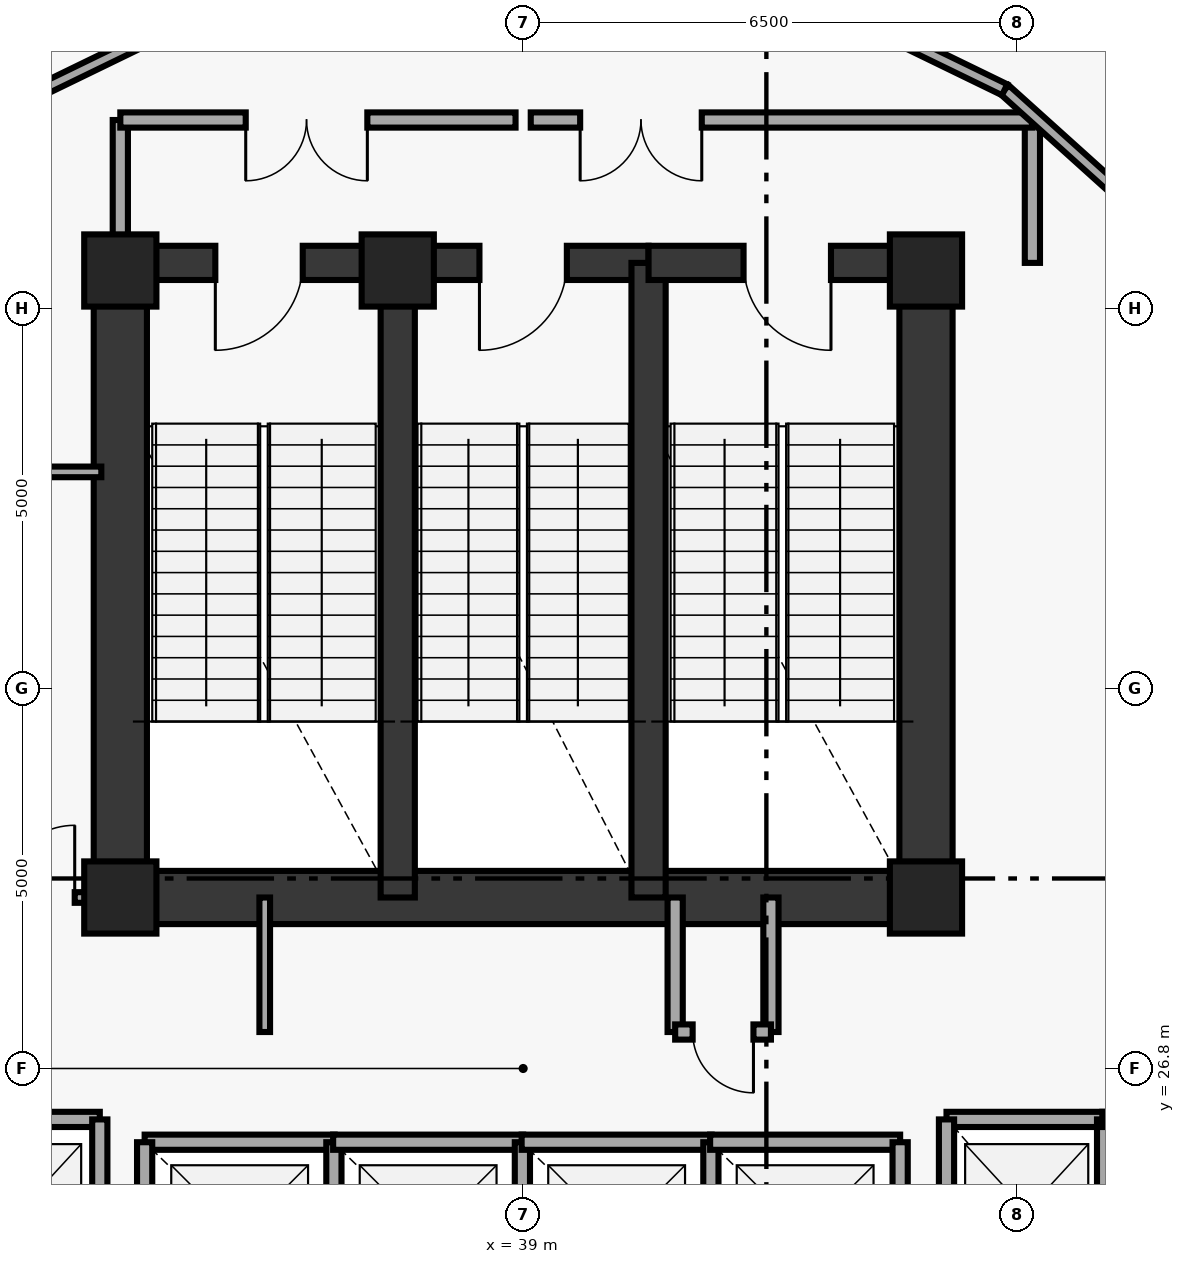
"""IFC4 building model, lengths in metres.
Left out: names, types, materials, properties, quantities, classifications, styles, units other than length and angle.
Written with IfcOpenShell. Run it as: python <this file> out.ifc"""

import sys

from ifc_helpers import new_model, si_unit, direction, frame, frame_2d, origin, origin_2d, place, context, subcontext, project, spatial, rectangle, extrude, element, fill, save


model = new_model("IFC4")
c1 = context("Model", 3, precision=1e-05, world=origin(), true_north=direction((0.0, 1.0)))
c2 = subcontext(c1, "Body", "Model", "MODEL_VIEW")
j1 = project(units=[si_unit("LENGTHUNIT", "METRE"), si_unit("PLANEANGLEUNIT", "RADIAN")], contexts=[c1])
p1 = place(None, origin())
s1 = spatial("IfcSite", under=j1, at=p1, CompositionType="ELEMENT")
p2 = place(p1, origin())
s2 = spatial("IfcBuilding", under=s1, at=p2, CompositionType="ELEMENT")
p3 = place(p2, frame((0.0, 0.0, 113.25)))
s3 = spatial("IfcBuildingStorey", under=s2, at=p3, CompositionType="ELEMENT", Elevation=113.25)
for number, where, z_axis, x_axis in (
    (1, (44.3, 29.05, 0.0), (0.0, 0.0, 1.0), (1.0, 0.0, 0.0)),
    (2, (44.3, 37.3, 0.0), (0.0, 0.0, 1.0), (1.0, 0.0, 0.0)),
    (3, (37.35, 37.3, 0.0), (0.0, 0.0, 1.0), (1.0, 0.0, 0.0)),
    (4, (33.7, 37.3, 0.0), (0.0, 0.0, 1.0), (1.0, 0.0, 0.0)),
    (5, (33.7, 29.05, 0.0), (0.0, 0.0, 1.0), (1.0, 0.0, 0.0)),
):
    element("IfcColumn", number, at=place(p3, frame(where, z_axis=z_axis, x_axis=x_axis)), inside=s3, PredefinedType="PILASTER", context=c2, shape_type="SweptSolid", body=[
        extrude(rectangle(XDim=0.95, YDim=0.95, at=origin_2d()), origin(), (0.0, 0.0, 1.0), 4.75),
    ])
for number, where, z_axis, x_axis in (
    (6, (33.7, 29.05, 0.0), (0.0, 0.0, 1.0), (0.0, 1.0, 0.0)),
    (7, (44.3, 29.05, 0.0), (0.0, 0.0, 1.0), (0.0, 1.0, 0.0)),
):
    element("IfcWall", number, at=place(p3, frame(where, z_axis=z_axis, x_axis=x_axis)), inside=s3, PredefinedType="SHEAR", context=c2, shape_type="SweptSolid", body=[
        extrude(rectangle(XDim=8.35, YDim=0.7, at=frame_2d((4.175, 0.0))), origin(), (0.0, 0.0, 1.0), 4.75),
    ])
p4 = place(p3, frame((33.7, 29.05, 0.0), z_axis=(0.0, 0.0, 1.0), x_axis=(1.0, 0.0, 0.0)))
e8 = element("IfcWall", 8, at=p4, inside=s3, PredefinedType="SHEAR", context=c2, shape_type="SweptSolid", body=[
    extrude(rectangle(XDim=10.6, YDim=0.7, at=frame_2d((5.3, 0.0))), origin(), (0.0, 0.0, 1.0), 4.75),
])
p5 = place(p3, frame((37.35, 37.4, 0.0), z_axis=(0.0, 0.0, 1.0), x_axis=(-1.0, 0.0, 0.0)))
e9 = element("IfcWall", 9, at=p5, inside=s3, PredefinedType="SHEAR", context=c2, shape_type="SweptSolid", body=[
    extrude(rectangle(XDim=3.65, YDim=0.45, at=frame_2d((1.825, 0.0))), origin(), (0.0, 0.0, 1.0), 4.75),
])
p6 = place(p5, frame((1.25, 0.0, 0.0)))
e10 = element("IfcOpeningElement", 10, at=p6, cuts=e9, PredefinedType="OPENING", context=c2, shape_type="SweptSolid", body=[
    extrude(rectangle(XDim=1.15, YDim=2.15, at=frame_2d((0.575, 1.075))), frame((0.0, 0.235, 0.0), z_axis=(0.0, -1.0, 0.0), x_axis=(1.0, 0.0, 0.0)), (0.0, 0.0, 1.0), 0.47),
])
p7 = place(p3, frame((37.35, 29.05, 0.0), z_axis=(0.0, 0.0, 1.0), x_axis=(0.0, 1.0, 0.0)))
e11 = element("IfcWall", 11, at=p7, inside=s3, PredefinedType="SHEAR", context=c2, shape_type="SweptSolid", body=[
    extrude(rectangle(XDim=8.35, YDim=0.45, at=frame_2d((4.175, 0.0))), origin(), (0.0, 0.0, 1.0), 4.75),
])
p8 = place(p3, frame((40.65, 37.4, 0.0), z_axis=(0.0, 0.0, 1.0), x_axis=(-1.0, 0.0, 0.0)))
e12 = element("IfcWall", 12, at=p8, inside=s3, PredefinedType="SHEAR", context=c2, shape_type="SweptSolid", body=[
    extrude(rectangle(XDim=3.3, YDim=0.45, at=frame_2d((1.65, 0.0))), origin(), (0.0, 0.0, 1.0), 4.75),
])
p9 = place(p8, frame((1.075, 0.0, 0.0)))
e13 = element("IfcOpeningElement", 13, at=p9, cuts=e12, PredefinedType="OPENING", context=c2, shape_type="SweptSolid", body=[
    extrude(rectangle(XDim=1.15, YDim=2.15, at=frame_2d((0.575, 1.075))), frame((0.0, 0.235, 0.0), z_axis=(0.0, -1.0, 0.0), x_axis=(1.0, 0.0, 0.0)), (0.0, 0.0, 1.0), 0.47),
])
p10 = place(p3, frame((40.65, 29.05, 0.0), z_axis=(0.0, 0.0, 1.0), x_axis=(0.0, 1.0, 0.0)))
e14 = element("IfcWall", 14, at=p10, inside=s3, PredefinedType="SHEAR", context=c2, shape_type="SweptSolid", body=[
    extrude(rectangle(XDim=8.35, YDim=0.45, at=frame_2d((4.175, 0.0))), origin(), (0.0, 0.0, 1.0), 4.75),
])
p11 = place(p3, frame((44.3, 37.4, 0.0), z_axis=(0.0, 0.0, 1.0), x_axis=(-1.0, 0.0, 0.0)))
e15 = element("IfcWall", 15, at=p11, inside=s3, PredefinedType="SHEAR", context=c2, shape_type="SweptSolid", body=[
    extrude(rectangle(XDim=3.65, YDim=0.45, at=frame_2d((1.825, 0.0))), origin(), (0.0, 0.0, 1.0), 4.75),
])
p12 = place(p11, frame((1.25, 0.0, 0.0)))
e16 = element("IfcOpeningElement", 16, at=p12, cuts=e15, PredefinedType="OPENING", context=c2, shape_type="SweptSolid", body=[
    extrude(rectangle(XDim=1.15, YDim=2.15, at=frame_2d((0.575, 1.075))), frame((0.0, 0.235, 0.0), z_axis=(0.0, -1.0, 0.0), x_axis=(1.0, 0.0, 0.0)), (0.0, 0.0, 1.0), 0.47),
])
for number, where, z_axis, x_axis in (
    (17, (33.7, 37.4, 0.0), (0.0, 0.0, 1.0), (0.0, 1.0, 0.0)),
    (18, (45.7, 37.4, 0.0), (0.0, 0.0, 1.0), (0.0, 1.0, 0.0)),
):
    element("IfcWall", number, at=place(p3, frame(where, z_axis=z_axis, x_axis=x_axis)), inside=s3, PredefinedType="SOLIDWALL", context=c2, shape_type="SweptSolid", body=[
        extrude(rectangle(XDim=1.88, YDim=0.2, at=frame_2d((0.94, 0.0))), origin(), (0.0, 0.0, 1.0), 4.75),
    ])
p13 = place(p3, frame((38.9, 39.28, 0.0), z_axis=(0.0, 0.0, 1.0), x_axis=(-1.0, 0.0, 0.0)))
e19 = element("IfcWall", 19, at=p13, inside=s3, PredefinedType="SOLIDWALL", context=c2, shape_type="SweptSolid", body=[
    extrude(rectangle(XDim=5.2, YDim=0.2, at=frame_2d((2.6, 0.0))), origin(), (0.0, 0.0, 1.0), 4.75),
])
p14 = place(p13, frame((1.95, 0.0, 0.0)))
e20 = element("IfcOpeningElement", 20, at=p14, cuts=e19, PredefinedType="OPENING", context=c2, shape_type="SweptSolid", body=[
    extrude(rectangle(XDim=1.6, YDim=2.2, at=frame_2d((0.8, 1.1))), frame((0.0, 0.11, 0.0), z_axis=(0.0, -1.0, 0.0), x_axis=(1.0, 0.0, 0.0)), (0.0, 0.0, 1.0), 0.22),
])
p15 = place(p3, frame((45.7, 39.28, 0.0), z_axis=(0.0, 0.0, 1.0), x_axis=(-1.0, 0.0, 0.0)))
e21 = element("IfcWall", 21, at=p15, inside=s3, PredefinedType="SOLIDWALL", context=c2, shape_type="SweptSolid", body=[
    extrude(rectangle(XDim=6.6, YDim=0.2, at=frame_2d((3.3, 0.0))), origin(), (0.0, 0.0, 1.0), 4.75),
])
p16 = place(p15, frame((4.35, 0.0, 0.0)))
e22 = element("IfcOpeningElement", 22, at=p16, cuts=e21, PredefinedType="OPENING", context=c2, shape_type="SweptSolid", body=[
    extrude(rectangle(XDim=1.6, YDim=2.2, at=frame_2d((0.8, 1.1))), frame((0.0, 0.11, 0.0), z_axis=(0.0, -1.0, 0.0), x_axis=(1.0, 0.0, 0.0)), (0.0, 0.0, 1.0), 0.22),
])
p17 = place(p3, frame((35.6, 27.28, 0.0), z_axis=(0.0, 0.0, 1.0), x_axis=(0.0, 1.0, 0.0)))
e23 = element("IfcWall", 23, at=p17, inside=s3, PredefinedType="PARTITIONING", context=c2, shape_type="SweptSolid", body=[
    extrude(rectangle(XDim=1.77, YDim=0.14, at=frame_2d((0.885, 0.0))), origin(), (0.0, 0.0, 1.0), 4.75),
])
for number, where, z_axis, x_axis in (
    (24, (41.0, 27.28, 0.0), (0.0, 0.0, 1.0), (0.0, 1.0, 0.0)),
    (25, (42.26, 27.28, 0.0), (0.0, 0.0, 1.0), (0.0, 1.0, 0.0)),
):
    element("IfcWall", number, at=place(p3, frame(where, z_axis=z_axis, x_axis=x_axis)), inside=s3, PredefinedType="SOLIDWALL", context=c2, shape_type="SweptSolid", body=[
        extrude(rectangle(XDim=1.77, YDim=0.2, at=frame_2d((0.885, 0.0))), origin(), (0.0, 0.0, 1.0), 4.75),
    ])
p18 = place(p3, frame((41.0, 27.28, 0.0), z_axis=(0.0, 0.0, 1.0), x_axis=(1.0, 0.0, 0.0)))
e26 = element("IfcWall", 26, at=p18, inside=s3, PredefinedType="SOLIDWALL", context=c2, shape_type="SweptSolid", body=[
    extrude(rectangle(XDim=1.26, YDim=0.2, at=frame_2d((0.63, 0.0))), origin(), (0.0, 0.0, 1.0), 4.75),
])
p19 = place(p18, frame((0.23, 0.0, 0.0)))
e27 = element("IfcOpeningElement", 27, at=p19, cuts=e26, PredefinedType="OPENING", context=c2, shape_type="SweptSolid", body=[
    extrude(rectangle(XDim=0.8, YDim=2.05, at=frame_2d((0.4, 1.025))), frame((0.0, 0.11, 0.0), z_axis=(0.0, -1.0, 0.0), x_axis=(1.0, 0.0, 0.0)), (0.0, 0.0, 1.0), 0.22),
])
p20 = place(p3, frame((31.32, 26.13, 0.0), z_axis=(0.0, 0.0, 1.0), x_axis=(1.0, 0.0, 0.0)))
e28 = element("IfcWall", 28, at=p20, inside=s3, PredefinedType="SOLIDWALL", context=c2, shape_type="SweptSolid", body=[
    extrude(rectangle(XDim=2.11, YDim=0.2, at=frame_2d((1.055, 0.0))), origin(), (0.0, 0.0, 1.0), 4.75),
])
p21 = place(p3, frame((33.43, 23.72, 0.0), z_axis=(0.0, 0.0, 1.0), x_axis=(0.0, 1.0, 0.0)))
e29 = element("IfcWall", 29, at=p21, inside=s3, PredefinedType="SOLIDWALL", context=c2, shape_type="SweptSolid", body=[
    extrude(rectangle(XDim=2.41, YDim=0.2, at=frame_2d((1.205, 0.0))), origin(), (0.0, 0.0, 1.0), 4.75),
])
p22 = place(p3, frame((44.57, 26.13, 0.0), z_axis=(0.0, 0.0, 1.0), x_axis=(1.0, 0.0, 0.0)))
e30 = element("IfcWall", 30, at=p22, inside=s3, PredefinedType="SOLIDWALL", context=c2, shape_type="SweptSolid", body=[
    extrude(rectangle(XDim=2.11, YDim=0.2, at=frame_2d((1.055, 0.0))), origin(), (0.0, 0.0, 1.0), 4.75),
])
for number, where, z_axis, x_axis in (
    (31, (44.57, 23.72, 0.0), (0.0, 0.0, 1.0), (0.0, 1.0, 0.0)),
    (32, (46.65, 23.72, 0.0), (0.0, 0.0, 1.0), (0.0, 1.0, 0.0)),
):
    element("IfcWall", number, at=place(p3, frame(where, z_axis=z_axis, x_axis=x_axis)), inside=s3, PredefinedType="SOLIDWALL", context=c2, shape_type="SweptSolid", body=[
        extrude(rectangle(XDim=2.41, YDim=0.2, at=frame_2d((1.205, 0.0))), origin(), (0.0, 0.0, 1.0), 4.75),
    ])
p23 = place(p3, frame((46.62, 26.13, 0.0), z_axis=(0.0, 0.0, 1.0), x_axis=(1.0, 0.0, 0.0)))
e33 = element("IfcWall", 33, at=p23, inside=s3, PredefinedType="SOLIDWALL", context=c2, shape_type="SweptSolid", body=[
    extrude(rectangle(XDim=2.31, YDim=0.2, at=frame_2d((1.155, 0.0))), origin(), (0.0, 0.0, 1.0), 4.75),
])
p24 = place(p3, frame((34.02, 25.83, 0.0), z_axis=(0.0, 0.0, 1.0), x_axis=(1.0, 0.0, 0.0)))
e34 = element("IfcWall", 34, at=p24, inside=s3, PredefinedType="SOLIDWALL", context=c2, shape_type="SweptSolid", body=[
    extrude(rectangle(XDim=2.5, YDim=0.2, at=frame_2d((1.25, 0.0))), origin(), (0.0, 0.0, 1.0), 4.75),
])
for number, where, z_axis, x_axis in (
    (35, (34.02, 23.42, 0.0), (0.0, 0.0, 1.0), (0.0, 1.0, 0.0)),
    (36, (36.51, 23.42, 0.0), (0.0, 0.0, 1.0), (0.0, 1.0, 0.0)),
):
    element("IfcWall", number, at=place(p3, frame(where, z_axis=z_axis, x_axis=x_axis)), inside=s3, PredefinedType="SOLIDWALL", context=c2, shape_type="SweptSolid", body=[
        extrude(rectangle(XDim=2.41, YDim=0.2, at=frame_2d((1.205, 0.0))), origin(), (0.0, 0.0, 1.0), 4.75),
    ])
p25 = place(p3, frame((36.5, 25.83, 0.0), z_axis=(0.0, 0.0, 1.0), x_axis=(1.0, 0.0, 0.0)))
e37 = element("IfcWall", 37, at=p25, inside=s3, PredefinedType="SOLIDWALL", context=c2, shape_type="SweptSolid", body=[
    extrude(rectangle(XDim=2.5, YDim=0.2, at=frame_2d((1.25, 0.0))), origin(), (0.0, 0.0, 1.0), 4.75),
])
p26 = place(p3, frame((38.99, 23.42, 0.0), z_axis=(0.0, 0.0, 1.0), x_axis=(0.0, 1.0, 0.0)))
e38 = element("IfcWall", 38, at=p26, inside=s3, PredefinedType="SOLIDWALL", context=c2, shape_type="SweptSolid", body=[
    extrude(rectangle(XDim=2.41, YDim=0.2, at=frame_2d((1.205, 0.0))), origin(), (0.0, 0.0, 1.0), 4.75),
])
p27 = place(p3, frame((38.98, 25.83, 0.0), z_axis=(0.0, 0.0, 1.0), x_axis=(1.0, 0.0, 0.0)))
e39 = element("IfcWall", 39, at=p27, inside=s3, PredefinedType="SOLIDWALL", context=c2, shape_type="SweptSolid", body=[
    extrude(rectangle(XDim=2.5, YDim=0.2, at=frame_2d((1.25, 0.0))), origin(), (0.0, 0.0, 1.0), 4.75),
])
p28 = place(p3, frame((41.47, 23.42, 0.0), z_axis=(0.0, 0.0, 1.0), x_axis=(0.0, 1.0, 0.0)))
e40 = element("IfcWall", 40, at=p28, inside=s3, PredefinedType="SOLIDWALL", context=c2, shape_type="SweptSolid", body=[
    extrude(rectangle(XDim=2.41, YDim=0.2, at=frame_2d((1.205, 0.0))), origin(), (0.0, 0.0, 1.0), 4.75),
])
p29 = place(p3, frame((41.46, 25.83, 0.0), z_axis=(0.0, 0.0, 1.0), x_axis=(1.0, 0.0, 0.0)))
e41 = element("IfcWall", 41, at=p29, inside=s3, PredefinedType="SOLIDWALL", context=c2, shape_type="SweptSolid", body=[
    extrude(rectangle(XDim=2.5, YDim=0.2, at=frame_2d((1.25, 0.0))), origin(), (0.0, 0.0, 1.0), 4.75),
])
p30 = place(p3, frame((43.96, 23.42, 0.0), z_axis=(0.0, 0.0, 1.0), x_axis=(0.0, 1.0, 0.0)))
e42 = element("IfcWall", 42, at=p30, inside=s3, PredefinedType="SOLIDWALL", context=c2, shape_type="SweptSolid", body=[
    extrude(rectangle(XDim=2.41, YDim=0.2, at=frame_2d((1.205, 0.0))), origin(), (0.0, 0.0, 1.0), 4.75),
])
p31 = place(p3, frame((30.85, 29.05, 0.0), z_axis=(0.0, 0.0, 1.0), x_axis=(1.0, 0.0, 0.0)))
e43 = element("IfcWall", 43, at=p31, inside=s3, PredefinedType="PARTITIONING", context=c2, shape_type="SweptSolid", body=[
    extrude(rectangle(XDim=2.43, YDim=0.14, at=frame_2d((1.215, 0.0))), origin(), (0.0, 0.0, 1.0), 3.74),
])
p32 = place(p31, frame((0.14, 0.0, 0.0)))
e44 = element("IfcOpeningElement", 44, at=p32, cuts=e43, PredefinedType="OPENING", context=c2, shape_type="SweptSolid", body=[
    extrude(rectangle(XDim=0.85, YDim=2.1, at=frame_2d((0.425, 1.05))), frame((0.0, 0.08, 0.0), z_axis=(0.0, -1.0, 0.0), x_axis=(1.0, 0.0, 0.0)), (0.0, 0.0, 1.0), 0.16),
])
p33 = place(p31, frame((1.3, 0.0, 0.0)))
e45 = element("IfcOpeningElement", 45, at=p33, cuts=e43, PredefinedType="OPENING", context=c2, shape_type="SweptSolid", body=[
    extrude(rectangle(XDim=0.95, YDim=2.1, at=frame_2d((0.475, 1.05))), frame((0.0, 0.08, 0.0), z_axis=(0.0, -1.0, 0.0), x_axis=(1.0, 0.0, 0.0)), (0.0, 0.0, 1.0), 0.16),
])
p34 = place(p3, frame((30.85, 34.65, 0.0), z_axis=(0.0, 0.0, 1.0), x_axis=(1.0, 0.0, 0.0)))
e46 = element("IfcWall", 46, at=p34, inside=s3, PredefinedType="PARTITIONING", context=c2, shape_type="SweptSolid", body=[
    extrude(rectangle(XDim=2.6, YDim=0.14, at=frame_2d((1.3, 0.0))), origin(), (0.0, 0.0, 1.0), 4.75),
])
p35 = place(p3, frame((47.959, 37.315, 0.0), z_axis=(0.0, 0.0, 1.0), x_axis=(-0.743094720901, 0.669186248939, 0.0)))
e47 = element("IfcWall", 47, at=p35, inside=s3, PredefinedType="PARTITIONING", context=c2, shape_type="SweptSolid", body=[
    extrude(rectangle(XDim=3.531, YDim=0.16, at=frame_2d((1.766, 0.0))), origin(), (0.0, 0.0, 1.0), 4.75),
])
for number, where, z_axis, x_axis in (
    (48, (45.335, 39.678, 0.0), (0.0, 0.0, 1.0), (-0.899, 0.437, 0.0)),
    (49, (35.721, 41.163, 0.0), (0.0, 0.0, 1.0), (-0.899, -0.437, 0.0)),
):
    element("IfcWall", number, at=place(p3, frame(where, z_axis=z_axis, x_axis=x_axis)), inside=s3, PredefinedType="PARTITIONING", context=c2, shape_type="SweptSolid", body=[
        extrude(rectangle(XDim=3.398, YDim=0.16, at=frame_2d((1.699, 0.0))), origin(), (0.0, 0.0, 1.0), 4.75),
    ])
p36 = place(p6, origin())
e50 = element("IfcDoor", 50, at=p36, inside=s3, OperationType="SINGLE_SWING_RIGHT", PredefinedType="DOOR", context=c2, shape_type="SweptSolid", body=[
    extrude(rectangle(XDim=1.15, YDim=2.15, at=frame_2d((0.575, 1.075))), frame((0.0, 0.025, 0.0), z_axis=(0.0, -1.0, 0.0), x_axis=(1.0, 0.0, 0.0)), (0.0, 0.0, 1.0), 0.05),
])
fill(e10, e50)
p37 = place(p9, origin())
e51 = element("IfcDoor", 51, at=p37, inside=s3, OperationType="SINGLE_SWING_RIGHT", PredefinedType="DOOR", context=c2, shape_type="SweptSolid", body=[
    extrude(rectangle(XDim=1.15, YDim=2.15, at=frame_2d((0.575, 1.075))), frame((0.0, 0.025, 0.0), z_axis=(0.0, -1.0, 0.0), x_axis=(1.0, 0.0, 0.0)), (0.0, 0.0, 1.0), 0.05),
])
fill(e13, e51)
p38 = place(p12, origin())
e52 = element("IfcDoor", 52, at=p38, inside=s3, OperationType="SINGLE_SWING_LEFT", PredefinedType="DOOR", context=c2, shape_type="SweptSolid", body=[
    extrude(rectangle(XDim=1.15, YDim=2.15, at=frame_2d((0.575, 1.075))), frame((0.0, 0.025, 0.0), z_axis=(0.0, -1.0, 0.0), x_axis=(1.0, 0.0, 0.0)), (0.0, 0.0, 1.0), 0.05),
])
fill(e16, e52)
p39 = place(p14, origin())
e53 = element("IfcDoor", 53, at=p39, inside=s3, OperationType="DOUBLE_DOOR_SINGLE_SWING", PredefinedType="DOOR", context=c2, shape_type="SweptSolid", body=[
    extrude(rectangle(XDim=1.6, YDim=2.2, at=frame_2d((0.8, 1.1))), frame((0.0, 0.025, 0.0), z_axis=(0.0, -1.0, 0.0), x_axis=(1.0, 0.0, 0.0)), (0.0, 0.0, 1.0), 0.05),
])
fill(e20, e53)
p40 = place(p16, origin())
e54 = element("IfcDoor", 54, at=p40, inside=s3, OperationType="DOUBLE_DOOR_SINGLE_SWING", PredefinedType="DOOR", context=c2, shape_type="SweptSolid", body=[
    extrude(rectangle(XDim=1.6, YDim=2.2, at=frame_2d((0.8, 1.1))), frame((0.0, 0.025, 0.0), z_axis=(0.0, -1.0, 0.0), x_axis=(1.0, 0.0, 0.0)), (0.0, 0.0, 1.0), 0.05),
])
fill(e22, e54)
p41 = place(p19, origin())
e55 = element("IfcDoor", 55, at=p41, inside=s3, OperationType="SINGLE_SWING_RIGHT", PredefinedType="DOOR", context=c2, shape_type="SweptSolid", body=[
    extrude(rectangle(XDim=0.8, YDim=2.05, at=frame_2d((0.4, 1.025))), frame((0.0, 0.025, 0.0), z_axis=(0.0, -1.0, 0.0), x_axis=(1.0, 0.0, 0.0)), (0.0, 0.0, 1.0), 0.05),
])
fill(e27, e55)
p42 = place(p33, origin())
e56 = element("IfcDoor", 56, at=p42, inside=s3, OperationType="SINGLE_SWING_RIGHT", PredefinedType="DOOR", context=c2, shape_type="SweptSolid", body=[
    extrude(rectangle(XDim=0.95, YDim=2.1, at=frame_2d((0.475, 1.05))), frame((0.0, 0.025, 0.0), z_axis=(0.0, -1.0, 0.0), x_axis=(1.0, 0.0, 0.0)), (0.0, 0.0, 1.0), 0.05),
])
fill(e45, e56)
save(model, sys.argv[1])
